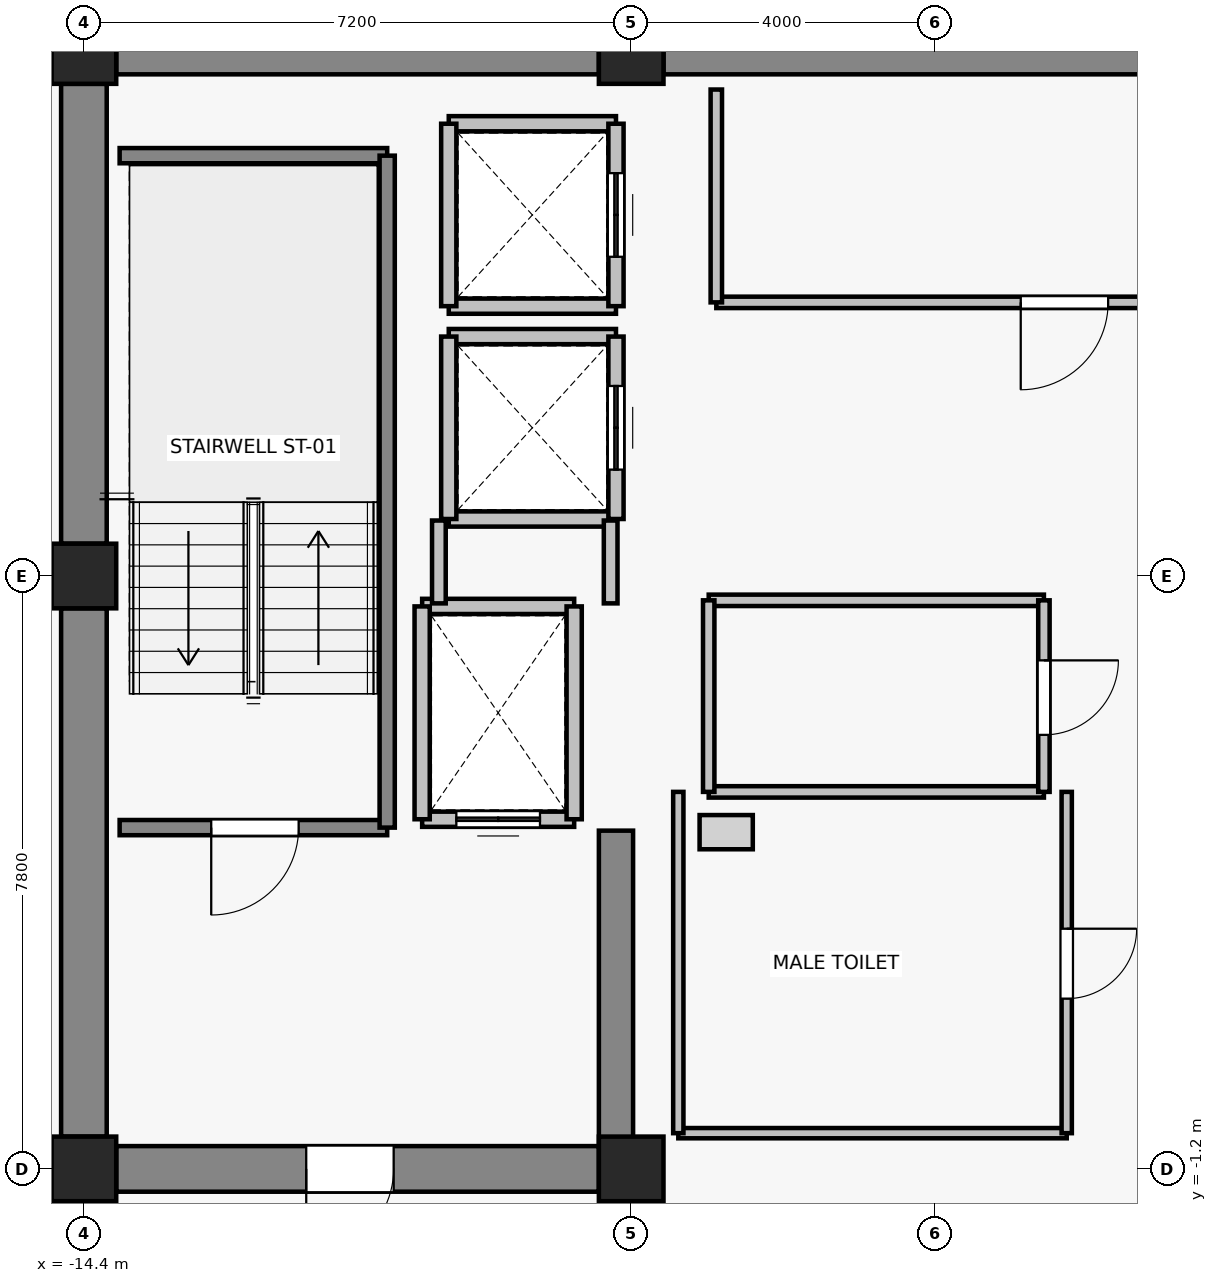
"""IFC4 building model, lengths in metres.
Left out: names, types, materials, properties, quantities, classifications, styles, units other than length and angle.
Written with IfcOpenShell. Run it as: python <this file> out.ifc"""

import sys

from ifc_helpers import new_model, si_unit, direction, frame, frame_2d, origin, origin_2d, place, context, subcontext, project, spatial, rectangle, extrude, source, transform, mapped, element, fill, save


model = new_model("IFC4")
c1 = context("Model", 3, precision=1e-05, world=origin(), true_north=direction((0.0, 1.0)))
c2 = subcontext(c1, "Body", "Model", "MODEL_VIEW")
j1 = project(units=[si_unit("LENGTHUNIT", "METRE"), si_unit("PLANEANGLEUNIT", "RADIAN")], contexts=[c1])
p1 = place(None, origin())
s1 = spatial("IfcSite", under=j1, at=p1, CompositionType="ELEMENT")
p2 = place(p1, origin())
s2 = spatial("IfcBuilding", under=s1, at=p2, CompositionType="ELEMENT")
p3 = place(p2, frame((0.0, 0.0, 268.3)))
s3 = spatial("IfcBuildingStorey", under=s2, at=p3, CompositionType="ELEMENT", Elevation=268.3)
for number, where, z_axis, x_axis in (
    (1, (-14.4, -1.2, 0.0), (0.0, 0.0, 1.0), (1.0, 0.0, 0.0)),
    (2, (-7.2, -1.2, 0.0), (0.0, 0.0, 1.0), (1.0, 0.0, 0.0)),
    (3, (-14.4, 6.6, 0.0), (0.0, 0.0, 1.0), (1.0, 0.0, 0.0)),
    (4, (-14.4, 13.5, 0.0), (0.0, 0.0, 1.0), (1.0, 0.0, 0.0)),
    (5, (-7.2, 13.5, 0.0), (0.0, 0.0, 1.0), (1.0, 0.0, 0.0)),
):
    element("IfcColumn", number, at=place(p3, frame(where, z_axis=z_axis, x_axis=x_axis)), inside=s3, PredefinedType="COLUMN", context=c2, shape_type="SweptSolid", body=[
        extrude(rectangle(XDim=0.85, YDim=0.85, at=origin_2d()), origin(), (0.0, 0.0, 1.0), 3.3),
    ])
p4 = place(p3, frame((-13.975, 13.5, 0.0), z_axis=(0.0, 0.0, 1.0), x_axis=(1.0, 0.0, 0.0)))
e6 = element("IfcWall", 6, at=p4, inside=s3, PredefinedType="SHEAR", context=c2, shape_type="SweptSolid", body=[
    extrude(rectangle(XDim=6.35, YDim=0.6, at=frame_2d((3.175, 0.0))), origin(), (0.0, 0.0, 1.0), 3.08),
])
p5 = place(p3, frame((-6.775, 13.5, 0.0), z_axis=(0.0, 0.0, 1.0), x_axis=(1.0, 0.0, 0.0)))
e7 = element("IfcWall", 7, at=p5, inside=s3, PredefinedType="SHEAR", context=c2, shape_type="SweptSolid", body=[
    extrude(rectangle(XDim=13.55, YDim=0.6, at=frame_2d((6.775, 0.0))), origin(), (0.0, 0.0, 1.0), 3.08),
])
p6 = place(p3, frame((-14.4, -0.775, 0.0), z_axis=(0.0, 0.0, 1.0), x_axis=(0.0, 1.0, 0.0)))
e8 = element("IfcWall", 8, at=p6, inside=s3, PredefinedType="SHEAR", context=c2, shape_type="SweptSolid", body=[
    extrude(rectangle(XDim=6.95, YDim=0.6, at=frame_2d((3.475, 0.0))), origin(), (0.0, 0.0, 1.0), 3.08),
])
p7 = place(p3, frame((-14.4, 7.025, 0.0), z_axis=(0.0, 0.0, 1.0), x_axis=(0.0, 1.0, 0.0)))
e9 = element("IfcWall", 9, at=p7, inside=s3, PredefinedType="SHEAR", context=c2, shape_type="SweptSolid", body=[
    extrude(rectangle(XDim=6.05, YDim=0.6, at=frame_2d((3.025, 0.0))), origin(), (0.0, 0.0, 1.0), 3.08),
])
p8 = place(p3, frame((-7.625, -1.2, 0.0), z_axis=(0.0, 0.0, 1.0), x_axis=(-1.0, 0.0, 0.0)))
e10 = element("IfcWall", 10, at=p8, inside=s3, PredefinedType="SHEAR", context=c2, shape_type="SweptSolid", body=[
    extrude(rectangle(XDim=6.35, YDim=0.6, at=frame_2d((3.175, 0.0))), origin(), (0.0, 0.0, 1.0), 3.08),
])
p9 = place(p8, frame((2.7, 0.0, 0.0)))
e11 = element("IfcOpeningElement", 11, at=p9, cuts=e10, PredefinedType="OPENING", context=c2, shape_type="SweptSolid", body=[
    extrude(rectangle(XDim=1.15, YDim=2.15, at=frame_2d((0.575, 1.075))), frame((0.0, 0.31, 0.0), z_axis=(0.0, -1.0, 0.0), x_axis=(1.0, 0.0, 0.0)), (0.0, 0.0, 1.0), 0.62),
])
p10 = place(p3, frame((-7.4, -0.9, 0.0), z_axis=(0.0, 0.0, 1.0), x_axis=(0.0, 1.0, 0.0)))
e12 = element("IfcWall", 12, at=p10, inside=s3, PredefinedType="SHEAR", context=c2, shape_type="SweptSolid", body=[
    extrude(rectangle(XDim=4.15, YDim=0.45, at=frame_2d((2.075, 0.0))), origin(), (0.0, 0.0, 1.0), 3.08),
])
p11 = place(p3, frame((-7.95, 3.4, 0.0), z_axis=(0.0, 0.0, 1.0), x_axis=(-1.0, 0.0, 0.0)))
e13 = element("IfcWall", 13, at=p11, inside=s3, PredefinedType="SOLIDWALL", context=c2, shape_type="SweptSolid", body=[
    extrude(rectangle(XDim=2.0, YDim=0.2, at=frame_2d((1.0, 0.0))), origin(), (0.0, 0.0, 1.0), 3.08),
])
p12 = place(p11, frame((0.45, 0.0, 0.0)))
e14 = element("IfcOpeningElement", 14, at=p12, cuts=e13, PredefinedType="OPENING", context=c2, shape_type="SweptSolid", body=[
    extrude(rectangle(XDim=1.1, YDim=2.2, at=frame_2d((0.55, 1.1))), frame((0.0, 0.11, 0.0), z_axis=(0.0, -1.0, 0.0), x_axis=(1.0, 0.0, 0.0)), (0.0, 0.0, 1.0), 0.22),
])
p13 = place(p3, frame((-9.95, 6.2, 0.0), z_axis=(0.0, 0.0, 1.0), x_axis=(1.0, 0.0, 0.0)))
e15 = element("IfcWall", 15, at=p13, inside=s3, PredefinedType="SOLIDWALL", context=c2, shape_type="SweptSolid", body=[
    extrude(rectangle(XDim=2.0, YDim=0.2, at=frame_2d((1.0, 0.0))), origin(), (0.0, 0.0, 1.0), 3.08),
])
for number, where, z_axis, x_axis in (
    (16, (-9.95, 3.4, 0.0), (0.0, 0.0, 1.0), (0.0, 1.0, 0.0)),
    (17, (-7.95, 6.2, 0.0), (0.0, 0.0, 1.0), (0.0, -1.0, 0.0)),
):
    element("IfcWall", number, at=place(p3, frame(where, z_axis=z_axis, x_axis=x_axis)), inside=s3, PredefinedType="SOLIDWALL", context=c2, shape_type="SweptSolid", body=[
        extrude(rectangle(XDim=2.8, YDim=0.2, at=frame_2d((1.4, 0.0))), origin(), (0.0, 0.0, 1.0), 3.08),
    ])
for number, where, z_axis, x_axis in (
    (18, (-7.4, 7.35, 0.0), (0.0, 0.0, 1.0), (-1.0, 0.0, 0.0)),
    (19, (-9.6, 9.75, 0.0), (0.0, 0.0, 1.0), (1.0, 0.0, 0.0)),
):
    element("IfcWall", number, at=place(p3, frame(where, z_axis=z_axis, x_axis=x_axis)), inside=s3, PredefinedType="SOLIDWALL", context=c2, shape_type="SweptSolid", body=[
        extrude(rectangle(XDim=2.2, YDim=0.2, at=frame_2d((1.1, 0.0))), origin(), (0.0, 0.0, 1.0), 2.47),
    ])
p14 = place(p3, frame((-9.6, 7.35, 0.0), z_axis=(0.0, 0.0, 1.0), x_axis=(0.0, 1.0, 0.0)))
e20 = element("IfcWall", 20, at=p14, inside=s3, PredefinedType="SOLIDWALL", context=c2, shape_type="SweptSolid", body=[
    extrude(rectangle(XDim=2.4, YDim=0.2, at=frame_2d((1.2, 0.0))), origin(), (0.0, 0.0, 1.0), 3.08),
])
p15 = place(p3, frame((-7.4, 9.75, 0.0), z_axis=(0.0, 0.0, 1.0), x_axis=(0.0, -1.0, 0.0)))
e21 = element("IfcWall", 21, at=p15, inside=s3, PredefinedType="SOLIDWALL", context=c2, shape_type="SweptSolid", body=[
    extrude(rectangle(XDim=2.4, YDim=0.2, at=frame_2d((1.2, 0.0))), origin(), (0.0, 0.0, 1.0), 2.47),
])
p16 = place(p15, frame((0.65, 0.0, 0.0)))
e22 = element("IfcOpeningElement", 22, at=p16, cuts=e21, PredefinedType="OPENING", context=c2, shape_type="SweptSolid", body=[
    extrude(rectangle(XDim=1.1, YDim=2.2, at=frame_2d((0.55, 1.1))), frame((0.0, 0.11, 0.0), z_axis=(0.0, -1.0, 0.0), x_axis=(1.0, 0.0, 0.0)), (0.0, 0.0, 1.0), 0.22),
])
for number, where, z_axis, x_axis in (
    (23, (-7.4, 10.15, 0.0), (0.0, 0.0, 1.0), (-1.0, 0.0, 0.0)),
    (24, (-9.6, 12.55, 0.0), (0.0, 0.0, 1.0), (1.0, 0.0, 0.0)),
):
    element("IfcWall", number, at=place(p3, frame(where, z_axis=z_axis, x_axis=x_axis)), inside=s3, PredefinedType="SOLIDWALL", context=c2, shape_type="SweptSolid", body=[
        extrude(rectangle(XDim=2.2, YDim=0.2, at=frame_2d((1.1, 0.0))), origin(), (0.0, 0.0, 1.0), 2.47),
    ])
p17 = place(p3, frame((-9.6, 10.15, 0.0), z_axis=(0.0, 0.0, 1.0), x_axis=(0.0, 1.0, 0.0)))
e25 = element("IfcWall", 25, at=p17, inside=s3, PredefinedType="SOLIDWALL", context=c2, shape_type="SweptSolid", body=[
    extrude(rectangle(XDim=2.4, YDim=0.2, at=frame_2d((1.2, 0.0))), origin(), (0.0, 0.0, 1.0), 3.08),
])
p18 = place(p3, frame((-7.4, 12.55, 0.0), z_axis=(0.0, 0.0, 1.0), x_axis=(0.0, -1.0, 0.0)))
e26 = element("IfcWall", 26, at=p18, inside=s3, PredefinedType="SOLIDWALL", context=c2, shape_type="SweptSolid", body=[
    extrude(rectangle(XDim=2.4, YDim=0.2, at=frame_2d((1.2, 0.0))), origin(), (0.0, 0.0, 1.0), 2.47),
])
p19 = place(p18, frame((0.65, 0.0, 0.0)))
e27 = element("IfcOpeningElement", 27, at=p19, cuts=e26, PredefinedType="OPENING", context=c2, shape_type="SweptSolid", body=[
    extrude(rectangle(XDim=1.1, YDim=2.2, at=frame_2d((0.55, 1.1))), frame((0.0, 0.11, 0.0), z_axis=(0.0, -1.0, 0.0), x_axis=(1.0, 0.0, 0.0)), (0.0, 0.0, 1.0), 0.22),
])
p20 = place(p3, frame((-10.41, 3.29, 0.0), z_axis=(0.0, 0.0, 1.0), x_axis=(-1.0, 0.0, 0.0)))
e28 = element("IfcWall", 28, at=p20, inside=s3, PredefinedType="SOLIDWALL", context=c2, shape_type="SweptSolid", body=[
    extrude(rectangle(XDim=3.52, YDim=0.2, at=frame_2d((1.76, 0.0))), origin(), (0.0, 0.0, 1.0), 3.08),
])
p21 = place(p20, frame((1.165, 0.0, 0.0)))
e29 = element("IfcOpeningElement", 29, at=p21, cuts=e28, PredefinedType="OPENING", context=c2, shape_type="SweptSolid", body=[
    extrude(rectangle(XDim=1.15, YDim=2.15, at=frame_2d((0.575, 1.075))), frame((0.0, 0.11, 0.0), z_axis=(0.0, -1.0, 0.0), x_axis=(1.0, 0.0, 0.0)), (0.0, 0.0, 1.0), 0.22),
])
p22 = place(p3, frame((-13.93, 12.13, 0.0), z_axis=(0.0, 0.0, 1.0), x_axis=(1.0, 0.0, 0.0)))
e30 = element("IfcWall", 30, at=p22, inside=s3, PredefinedType="SOLIDWALL", context=c2, shape_type="SweptSolid", body=[
    extrude(rectangle(XDim=3.52, YDim=0.2, at=frame_2d((1.76, 0.0))), origin(), (0.0, 0.0, 1.0), 3.08),
])
p23 = place(p3, frame((-10.41, 12.13, 0.0), z_axis=(0.0, 0.0, 1.0), x_axis=(0.0, -1.0, 0.0)))
e31 = element("IfcWall", 31, at=p23, inside=s3, PredefinedType="SOLIDWALL", context=c2, shape_type="SweptSolid", body=[
    extrude(rectangle(XDim=8.84, YDim=0.2, at=frame_2d((4.42, 0.0))), origin(), (0.0, 0.0, 1.0), 3.08),
])
p24 = place(p3, frame((-9.73, 6.24, 0.0), z_axis=(0.0, 0.0, 1.0), x_axis=(0.0, 1.0, 0.0)))
e32 = element("IfcWall", 32, at=p24, inside=s3, PredefinedType="PARTITIONING", context=c2, shape_type="SweptSolid", body=[
    extrude(rectangle(XDim=1.09, YDim=0.18, at=frame_2d((0.545, 0.0))), origin(), (0.0, 0.0, 1.0), 3.08),
])
p25 = place(p3, frame((-7.47, 7.33, 0.0), z_axis=(0.0, 0.0, 1.0), x_axis=(0.0, -1.0, 0.0)))
e33 = element("IfcWall", 33, at=p25, inside=s3, PredefinedType="PARTITIONING", context=c2, shape_type="SweptSolid", body=[
    extrude(rectangle(XDim=1.09, YDim=0.18, at=frame_2d((0.545, 0.0))), origin(), (0.0, 0.0, 1.0), 2.47),
])
p26 = place(p3, frame((6.08, 10.2, 0.0), z_axis=(0.0, 0.0, 1.0), x_axis=(-1.0, 0.0, 0.0)))
e34 = element("IfcWall", 34, at=p26, inside=s3, PredefinedType="PARTITIONING", context=c2, shape_type="SweptSolid", body=[
    extrude(rectangle(XDim=12.16, YDim=0.15, at=frame_2d((6.08, 0.0))), origin(), (0.0, 0.0, 1.0), 3.08),
])
p27 = place(p26, frame((7.005, 0.0, 0.0)))
e35 = element("IfcOpeningElement", 35, at=p27, cuts=e34, PredefinedType="OPENING", context=c2, shape_type="SweptSolid", body=[
    extrude(rectangle(XDim=1.15, YDim=2.15, at=frame_2d((0.575, 1.075))), frame((0.0, 0.085, 0.0), z_axis=(0.0, -1.0, 0.0), x_axis=(1.0, 0.0, 0.0)), (0.0, 0.0, 1.0), 0.17),
])
p28 = place(p3, frame((-6.08, 10.2, 0.0), z_axis=(0.0, 0.0, 1.0), x_axis=(0.0, 1.0, 0.0)))
e36 = element("IfcWall", 36, at=p28, inside=s3, PredefinedType="PARTITIONING", context=c2, shape_type="SweptSolid", body=[
    extrude(rectangle(XDim=2.8, YDim=0.15, at=frame_2d((1.4, 0.0))), origin(), (0.0, 0.0, 1.0), 3.08),
])
for number, where, z_axis, x_axis in (
    (37, (-1.77, 3.76, 0.0), (0.0, 0.0, 1.0), (-1.0, 0.0, 0.0)),
    (38, (-6.18, 6.28, 0.0), (0.0, 0.0, 1.0), (1.0, 0.0, 0.0)),
):
    element("IfcWall", number, at=place(p3, frame(where, z_axis=z_axis, x_axis=x_axis)), inside=s3, PredefinedType="PARTITIONING", context=c2, shape_type="SweptSolid", body=[
        extrude(rectangle(XDim=4.41, YDim=0.15, at=frame_2d((2.205, 0.0))), origin(), (0.0, 0.0, 1.0), 3.08),
    ])
p29 = place(p3, frame((-6.18, 3.76, 0.0), z_axis=(0.0, 0.0, 1.0), x_axis=(0.0, 1.0, 0.0)))
e39 = element("IfcWall", 39, at=p29, inside=s3, PredefinedType="PARTITIONING", context=c2, shape_type="SweptSolid", body=[
    extrude(rectangle(XDim=2.52, YDim=0.15, at=frame_2d((1.26, 0.0))), origin(), (0.0, 0.0, 1.0), 3.08),
])
p30 = place(p3, frame((-1.77, 6.28, 0.0), z_axis=(0.0, 0.0, 1.0), x_axis=(0.0, -1.0, 0.0)))
e40 = element("IfcWall", 40, at=p30, inside=s3, PredefinedType="PARTITIONING", context=c2, shape_type="SweptSolid", body=[
    extrude(rectangle(XDim=2.52, YDim=0.15, at=frame_2d((1.26, 0.0))), origin(), (0.0, 0.0, 1.0), 3.08),
])
p31 = place(p30, frame((0.79, 0.0, 0.0)))
e41 = element("IfcOpeningElement", 41, at=p31, cuts=e40, PredefinedType="OPENING", context=c2, shape_type="SweptSolid", body=[
    extrude(rectangle(XDim=0.98, YDim=2.15, at=frame_2d((0.49, 1.075))), frame((0.0, 0.085, 0.0), z_axis=(0.0, -1.0, 0.0), x_axis=(1.0, 0.0, 0.0)), (0.0, 0.0, 1.0), 0.17),
])
p32 = place(p3, frame((-1.47, -0.73, 0.0), z_axis=(0.0, 0.0, 1.0), x_axis=(-1.0, 0.0, 0.0)))
e42 = element("IfcWall", 42, at=p32, inside=s3, PredefinedType="PARTITIONING", context=c2, shape_type="SweptSolid", body=[
    extrude(rectangle(XDim=5.11, YDim=0.135, at=frame_2d((2.555, 0.0))), origin(), (0.0, 0.0, 1.0), 3.08),
])
p33 = place(p3, frame((-6.58, -0.73, 0.0), z_axis=(0.0, 0.0, 1.0), x_axis=(0.0, 1.0, 0.0)))
e43 = element("IfcWall", 43, at=p33, inside=s3, PredefinedType="PARTITIONING", context=c2, shape_type="SweptSolid", body=[
    extrude(rectangle(XDim=4.49, YDim=0.135, at=frame_2d((2.245, 0.0))), origin(), (0.0, 0.0, 1.0), 3.08),
])
p34 = place(p3, frame((-1.47, 3.76, 0.0), z_axis=(0.0, 0.0, 1.0), x_axis=(0.0, -1.0, 0.0)))
e44 = element("IfcWall", 44, at=p34, inside=s3, PredefinedType="PARTITIONING", context=c2, shape_type="SweptSolid", body=[
    extrude(rectangle(XDim=4.49, YDim=0.135, at=frame_2d((2.245, 0.0))), origin(), (0.0, 0.0, 1.0), 3.08),
])
p35 = place(p34, frame((1.8, 0.0, 0.0)))
e45 = element("IfcOpeningElement", 45, at=p35, cuts=e44, PredefinedType="OPENING", context=c2, shape_type="SweptSolid", body=[
    extrude(rectangle(XDim=0.92, YDim=2.1, at=frame_2d((0.46, 1.05))), frame((0.0, 0.077, 0.0), z_axis=(0.0, -1.0, 0.0), x_axis=(1.0, 0.0, 0.0)), (0.0, 0.0, 1.0), 0.155),
])
m1 = source(origin(), c2, "Body", "SweptSolid", [
    extrude(rectangle(XDim=1.1, YDim=2.2, at=frame_2d((0.55, 1.1))), frame((0.0, 0.025, 0.0), z_axis=(0.0, -1.0, 0.0), x_axis=(1.0, 0.0, 0.0)), (0.0, 0.0, 1.0), 0.05),
])
p36 = place(p12, origin())
e46 = element("IfcDoor", 46, at=p36, inside=s3, OperationType="DOUBLE_DOOR_SLIDING", PredefinedType="DOOR", context=c2, shape_type="MappedRepresentation", body=[
    mapped(m1, transform((0.0, 0.0, 0.0), x_axis=(1.0, 0.0, 0.0), y_axis=(0.0, 1.0, 0.0), z_axis=(0.0, 0.0, 1.0), scale=1.0)),
])
fill(e14, e46)
p37 = place(p16, origin())
e47 = element("IfcDoor", 47, at=p37, inside=s3, OperationType="DOUBLE_DOOR_SLIDING", PredefinedType="DOOR", context=c2, shape_type="MappedRepresentation", body=[
    mapped(m1, transform((0.0, 0.0, 0.0), x_axis=(1.0, 0.0, 0.0), y_axis=(0.0, 1.0, 0.0), z_axis=(0.0, 0.0, 1.0), scale=1.0)),
])
fill(e22, e47)
p38 = place(p19, origin())
e48 = element("IfcDoor", 48, at=p38, inside=s3, OperationType="DOUBLE_DOOR_SLIDING", PredefinedType="DOOR", context=c2, shape_type="MappedRepresentation", body=[
    mapped(m1, transform((0.0, 0.0, 0.0), x_axis=(1.0, 0.0, 0.0), y_axis=(0.0, 1.0, 0.0), z_axis=(0.0, 0.0, 1.0), scale=1.0)),
])
fill(e27, e48)
m2 = source(origin(), c2, "Body", "SweptSolid", [
    extrude(rectangle(XDim=1.15, YDim=2.15, at=frame_2d((0.575, 1.075))), frame((0.0, 0.025, 0.0), z_axis=(0.0, -1.0, 0.0), x_axis=(1.0, 0.0, 0.0)), (0.0, 0.0, 1.0), 0.05),
])
p39 = place(p21, origin())
e49 = element("IfcDoor", 49, at=p39, inside=s3, OperationType="SINGLE_SWING_RIGHT", PredefinedType="DOOR", context=c2, shape_type="MappedRepresentation", body=[
    mapped(m2, transform((0.0, 0.0, 0.0), x_axis=(1.0, 0.0, 0.0), y_axis=(0.0, 1.0, 0.0), z_axis=(0.0, 0.0, 1.0), scale=1.0)),
])
fill(e29, e49)
p40 = place(p9, origin())
e50 = element("IfcDoor", 50, at=p40, inside=s3, OperationType="SINGLE_SWING_RIGHT", PredefinedType="DOOR", context=c2, shape_type="MappedRepresentation", body=[
    mapped(m2, transform((0.0, 0.0, 0.0), x_axis=(1.0, 0.0, 0.0), y_axis=(0.0, 1.0, 0.0), z_axis=(0.0, 0.0, 1.0), scale=1.0)),
])
fill(e11, e50)
p41 = place(p27, origin())
e51 = element("IfcDoor", 51, at=p41, inside=s3, OperationType="SINGLE_SWING_RIGHT", PredefinedType="DOOR", context=c2, shape_type="MappedRepresentation", body=[
    mapped(m2, transform((0.0, 0.0, 0.0), x_axis=(1.0, 0.0, 0.0), y_axis=(0.0, 1.0, 0.0), z_axis=(0.0, 0.0, 1.0), scale=1.0)),
])
fill(e35, e51)
m3 = source(origin(), c2, "Body", "SweptSolid", [
    extrude(rectangle(XDim=0.98, YDim=2.15, at=frame_2d((0.49, 1.075))), frame((0.0, 0.025, 0.0), z_axis=(0.0, -1.0, 0.0), x_axis=(1.0, 0.0, 0.0)), (0.0, 0.0, 1.0), 0.05),
])
p42 = place(p31, origin())
e52 = element("IfcDoor", 52, at=p42, inside=s3, OperationType="SINGLE_SWING_LEFT", PredefinedType="DOOR", context=c2, shape_type="MappedRepresentation", body=[
    mapped(m3, transform((0.0, 0.0, 0.0), x_axis=(1.0, 0.0, 0.0), y_axis=(0.0, 1.0, 0.0), z_axis=(0.0, 0.0, 1.0), scale=1.0)),
])
fill(e41, e52)
m4 = source(origin(), c2, "Body", "SweptSolid", [
    extrude(rectangle(XDim=0.92, YDim=2.1, at=frame_2d((0.46, 1.05))), frame((0.0, 0.025, 0.0), z_axis=(0.0, -1.0, 0.0), x_axis=(1.0, 0.0, 0.0)), (0.0, 0.0, 1.0), 0.05),
])
p43 = place(p35, origin())
e53 = element("IfcDoor", 53, at=p43, inside=s3, OperationType="SINGLE_SWING_LEFT", PredefinedType="DOOR", context=c2, shape_type="MappedRepresentation", body=[
    mapped(m4, transform((0.0, 0.0, 0.0), x_axis=(1.0, 0.0, 0.0), y_axis=(0.0, 1.0, 0.0), z_axis=(0.0, 0.0, 1.0), scale=1.0)),
])
fill(e45, e53)
save(model, sys.argv[1])
